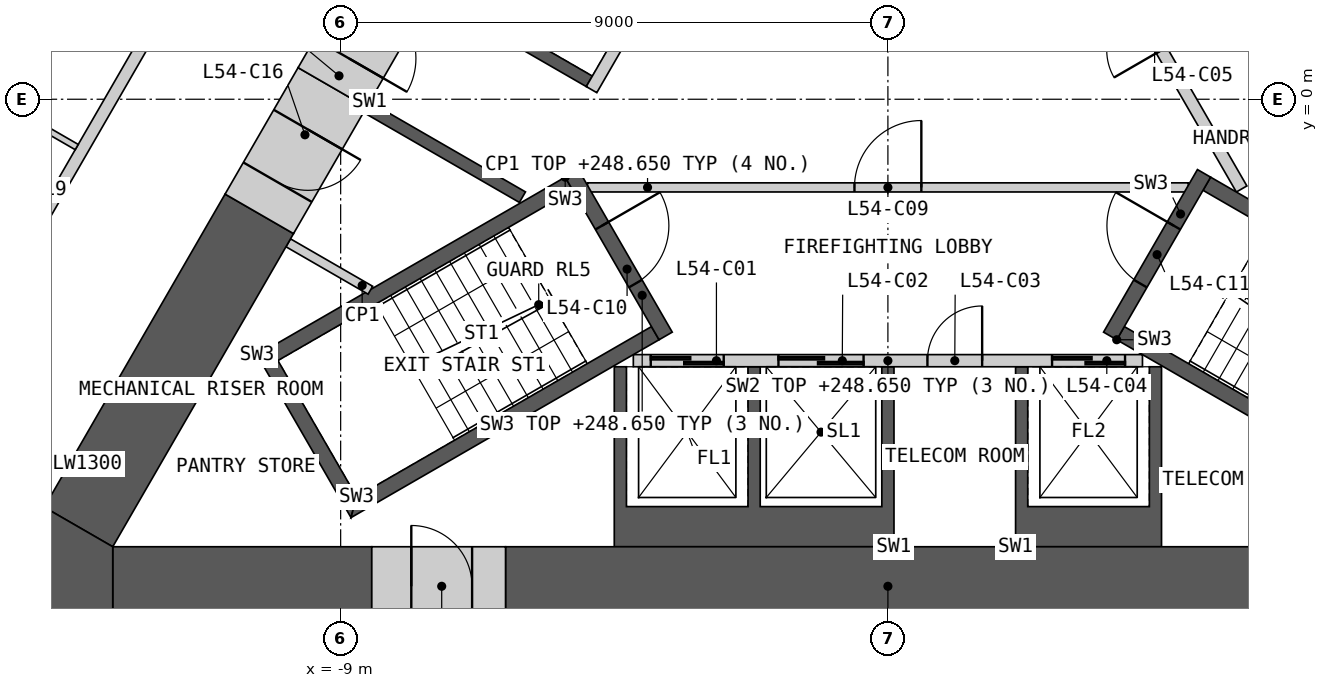
"""IFC4 building model, lengths in metres.
Left out: names, types, materials, properties, quantities, classifications, styles, units other than length and angle.
Written with IfcOpenShell. Run it as: python <this file> out.ifc"""

import sys

from ifc_helpers import new_model, si_unit, direction, frame, frame_2d, origin, place, context, subcontext, project, spatial, polyline, rectangle, outline, extrude, element, fill, save


model = new_model("IFC4")
c1 = context("Model", 3, precision=1e-05, world=origin(), true_north=direction((0.0, 1.0)))
c2 = subcontext(c1, "Body", "Model", "MODEL_VIEW")
j1 = project(units=[si_unit("LENGTHUNIT", "METRE"), si_unit("PLANEANGLEUNIT", "RADIAN")], contexts=[c1])
p1 = place(None, origin())
s1 = spatial("IfcSite", under=j1, at=p1, CompositionType="ELEMENT")
p2 = place(p1, origin())
s2 = spatial("IfcBuilding", under=s1, at=p2, CompositionType="ELEMENT")
p3 = place(p2, frame((0.0, 0.0, 245.4)))
s3 = spatial("IfcBuildingStorey", under=s2, at=p3, CompositionType="ELEMENT", Elevation=245.4)
p4 = place(p3, origin())
e1 = element("IfcWall", 1, at=p4, inside=s3, PredefinedType="SHEAR", context=c2, shape_type="SweptSolid", body=[
    extrude(outline(polyline([(0.1, -7.36), (-4.5, -7.36), (-4.5, -4.4), (-4.3, -4.4), (-4.3, -6.7), (-2.3, -6.7), (-2.3, -4.4), (-2.1, -4.4), (-2.1, -6.7), (-0.1, -6.7), (-0.1, -4.4), (0.1, -4.4), (0.1, -7.36)])), origin(), (0.0, 0.0, 1.0), 3.25),
])
p5 = place(p3, origin())
e2 = element("IfcWall", 2, at=p5, inside=s3, PredefinedType="SHEAR", context=c2, shape_type="SweptSolid", body=[
    extrude(outline(polyline([(2.1, -7.36), (2.1, -4.4), (2.3, -4.4), (2.3, -6.7), (4.3, -6.7), (4.3, -4.4), (4.5, -4.4), (4.5, -7.36), (2.1, -7.36)])), origin(), (0.0, 0.0, 1.0), 3.25),
])
p6 = place(p3, frame((-4.187, -4.3, 0.0), z_axis=(0.0, 0.0, 1.0), x_axis=(1.0, 0.0, 0.0)))
e3 = element("IfcWall", 3, at=p6, inside=s3, PredefinedType="SOLIDWALL", context=c2, shape_type="SweptSolid", body=[
    extrude(rectangle(XDim=8.373, YDim=0.2, at=frame_2d((4.187, 0.0))), origin(), (0.0, 0.0, 1.0), 3.25),
])
p7 = place(p6, frame((0.287, 0.0, 0.0)))
e4 = element("IfcOpeningElement", 4, at=p7, cuts=e3, PredefinedType="OPENING", context=c2, shape_type="SweptSolid", body=[
    extrude(rectangle(XDim=1.2, YDim=2.1, at=frame_2d((0.6, 1.05))), frame((0.0, 0.11, 0.0), z_axis=(0.0, -1.0, 0.0), x_axis=(1.0, 0.0, 0.0)), (0.0, 0.0, 1.0), 0.22),
])
p8 = place(p6, frame((2.387, 0.0, 0.0)))
e5 = element("IfcOpeningElement", 5, at=p8, cuts=e3, PredefinedType="OPENING", context=c2, shape_type="SweptSolid", body=[
    extrude(rectangle(XDim=1.4, YDim=2.1, at=frame_2d((0.7, 1.05))), frame((0.0, 0.11, 0.0), z_axis=(0.0, -1.0, 0.0), x_axis=(1.0, 0.0, 0.0)), (0.0, 0.0, 1.0), 0.22),
])
p9 = place(p6, frame((4.837, 0.0, 0.0)))
e6 = element("IfcOpeningElement", 6, at=p9, cuts=e3, PredefinedType="OPENING", context=c2, shape_type="SweptSolid", body=[
    extrude(rectangle(XDim=0.9, YDim=2.1, at=frame_2d((0.45, 1.05))), frame((0.0, 0.11, 0.0), z_axis=(0.0, -1.0, 0.0), x_axis=(1.0, 0.0, 0.0)), (0.0, 0.0, 1.0), 0.22),
])
p10 = place(p6, frame((6.887, 0.0, 0.0)))
e7 = element("IfcOpeningElement", 7, at=p10, cuts=e3, PredefinedType="OPENING", context=c2, shape_type="SweptSolid", body=[
    extrude(rectangle(XDim=1.2, YDim=2.1, at=frame_2d((0.6, 1.05))), frame((0.0, 0.11, 0.0), z_axis=(0.0, -1.0, 0.0), x_axis=(1.0, 0.0, 0.0)), (0.0, 0.0, 1.0), 0.22),
])
p11 = place(p3, origin())
e8 = element("IfcWall", 8, at=p11, inside=s3, PredefinedType="SHEAR", context=c2, shape_type="SweptSolid", body=[
    extrude(outline(polyline([(4.124, 7.577), (8.624, -0.217), (8.231, -0.444), (6.061, -1.697), (5.96, -1.524), (7.952, -0.374), (4.752, 5.169), (2.76, 4.019), (2.66, 4.192), (4.652, 5.342), (3.652, 7.074), (1.66, 5.924), (1.561, 6.097), (3.731, 7.35), (4.124, 7.577)])), origin(), (0.0, 0.0, 1.0), 3.25),
])
p12 = place(p3, frame((5.817, -1.476, 0.0), z_axis=(0.0, 0.0, 1.0), x_axis=(-0.500002616675, 0.866023893041, 0.0)))
e9 = element("IfcWall", 9, at=p12, inside=s3, PredefinedType="SOLIDWALL", context=c2, shape_type="SweptSolid", body=[
    extrude(rectangle(XDim=8.373, YDim=0.2, at=frame_2d((4.187, 0.0))), origin(), (0.0, 0.0, 1.0), 3.25),
])
p13 = place(p12, frame((2.637, 0.0, 0.0)))
e10 = element("IfcOpeningElement", 10, at=p13, cuts=e9, PredefinedType="OPENING", context=c2, shape_type="SweptSolid", body=[
    extrude(rectangle(XDim=0.9, YDim=2.1, at=frame_2d((0.45, 1.05))), frame((0.0, 0.11, 0.0), z_axis=(0.0, -1.0, 0.0), x_axis=(1.0, 0.0, 0.0)), (0.0, 0.0, 1.0), 0.22),
])
p14 = place(p12, frame((6.937, 0.0, 0.0)))
e11 = element("IfcOpeningElement", 11, at=p14, cuts=e9, PredefinedType="OPENING", context=c2, shape_type="SweptSolid", body=[
    extrude(rectangle(XDim=1.1, YDim=2.1, at=frame_2d((0.55, 1.05))), frame((0.0, 0.11, 0.0), z_axis=(0.0, -1.0, 0.0), x_axis=(1.0, 0.0, 0.0)), (0.0, 0.0, 1.0), 0.22),
])
p15 = place(p3, origin())
e12 = element("IfcWall", 12, at=p15, inside=s3, PredefinedType="SHEAR", context=c2, shape_type="SweptSolid", body=[
    extrude(outline(polyline([(-7.524, 1.688), (-4.124, 7.577), (-3.731, 7.35), (-1.561, 6.097), (-1.66, 5.924), (-3.652, 7.074), (-4.652, 5.342), (-2.66, 4.192), (-2.76, 4.019), (-4.752, 5.169), (-5.752, 3.437), (-3.76, 2.287), (-3.861, 2.113), (-5.852, 3.263), (-6.852, 1.531), (-4.861, 0.381), (-4.96, 0.208), (-7.131, 1.461), (-7.524, 1.688)])), origin(), (0.0, 0.0, 1.0), 3.25),
])
p16 = place(p3, origin())
e13 = element("IfcWall", 13, at=p16, inside=s3, PredefinedType="SHEAR", context=c2, shape_type="SweptSolid", body=[
    extrude(outline(polyline([(-8.524, -0.044), (-8.131, -0.271), (-5.96, -1.524), (-6.061, -1.697), (-8.231, -0.444), (-8.624, -0.217), (-8.524, -0.044)])), origin(), (0.0, 0.0, 1.0), 3.25),
])
p17 = place(p3, frame((-1.631, 5.776, 0.0), z_axis=(0.0, 0.0, 1.0), x_axis=(-0.499992876559, -0.866029516466, 0.0)))
e14 = element("IfcWall", 14, at=p17, inside=s3, PredefinedType="SOLIDWALL", context=c2, shape_type="SweptSolid", body=[
    extrude(rectangle(XDim=6.486, YDim=0.2, at=frame_2d((3.243, 0.0))), origin(), (0.0, 0.0, 1.0), 3.25),
])
p18 = place(p17, frame((0.337, 0.0, 0.0)))
e15 = element("IfcOpeningElement", 15, at=p18, cuts=e14, PredefinedType="OPENING", context=c2, shape_type="SweptSolid", body=[
    extrude(rectangle(XDim=1.1, YDim=2.1, at=frame_2d((0.55, 1.05))), frame((0.0, 0.11, 0.0), z_axis=(0.0, -1.0, 0.0), x_axis=(1.0, 0.0, 0.0)), (0.0, 0.0, 1.0), 0.22),
])
p19 = place(p17, frame((2.537, 0.0, 0.0)))
e16 = element("IfcOpeningElement", 16, at=p19, cuts=e14, PredefinedType="OPENING", context=c2, shape_type="SweptSolid", body=[
    extrude(rectangle(XDim=1.1, YDim=2.1, at=frame_2d((0.55, 1.05))), frame((0.0, 0.11, 0.0), z_axis=(0.0, -1.0, 0.0), x_axis=(1.0, 0.0, 0.0)), (0.0, 0.0, 1.0), 0.22),
])
p20 = place(p3, frame((-4.941, -1.45, 0.0), z_axis=(0.0, 0.0, 1.0), x_axis=(1.0, 0.0, 0.0)))
e17 = element("IfcWall", 17, at=p20, inside=s3, PredefinedType="PARTITIONING", context=c2, shape_type="SweptSolid", body=[
    extrude(rectangle(XDim=9.882, YDim=0.15, at=frame_2d((4.941, 0.0))), origin(), (0.0, 0.0, 1.0), 3.25),
])
p21 = place(p20, frame((4.391, 0.0, 0.0)))
e18 = element("IfcOpeningElement", 18, at=p21, cuts=e17, PredefinedType="OPENING", context=c2, shape_type="SweptSolid", body=[
    extrude(rectangle(XDim=1.1, YDim=2.1, at=frame_2d((0.55, 1.05))), frame((0.0, 0.085, 0.0), z_axis=(0.0, -1.0, 0.0), x_axis=(1.0, 0.0, 0.0)), (0.0, 0.0, 1.0), 0.17),
])
p22 = place(p3, origin())
e19 = element("IfcWall", 19, at=p22, inside=s3, PredefinedType="SHEAR", context=c2, shape_type="SweptSolid", body=[
    extrude(outline(polyline([(-5.307, -1.281), (-10.374, -4.206), (-10.032, -4.298), (-5.182, -1.498), (-5.307, -1.281)])), origin(), (0.0, 0.0, 1.0), 3.25),
])
p23 = place(p3, origin())
e20 = element("IfcWall", 20, at=p23, inside=s3, PredefinedType="SHEAR", context=c2, shape_type="SweptSolid", body=[
    extrude(outline(polyline([(-10.374, -4.206), (-8.83, -6.881), (-8.738, -6.539), (-10.032, -4.298), (-10.374, -4.206)])), origin(), (0.0, 0.0, 1.0), 3.25),
])
p24 = place(p3, origin())
e21 = element("IfcWall", 21, at=p24, inside=s3, PredefinedType="SHEAR", context=c2, shape_type="SweptSolid", body=[
    extrude(outline(polyline([(-8.738, -6.539), (-8.83, -6.881), (-3.763, -3.956), (-3.888, -3.739), (-8.738, -6.539)])), origin(), (0.0, 0.0, 1.0), 3.25),
])
p25 = place(p3, frame((-5.199, -1.219, 0.0), z_axis=(0.0, 0.0, 1.0), x_axis=(0.499982516597, -0.866035497597, 0.0)))
e22 = element("IfcWall", 22, at=p25, inside=s3, PredefinedType="SHEAR", context=c2, shape_type="SweptSolid", body=[
    extrude(rectangle(XDim=3.088, YDim=0.25, at=frame_2d((1.544, 0.0))), origin(), (0.0, 0.0, 1.0), 3.25),
])
p26 = place(p25, frame((0.994, 0.0, 0.0)))
e23 = element("IfcOpeningElement", 23, at=p26, cuts=e22, PredefinedType="OPENING", context=c2, shape_type="SweptSolid", body=[
    extrude(rectangle(XDim=1.1, YDim=2.1, at=frame_2d((0.55, 1.05))), frame((0.0, 0.135, 0.0), z_axis=(0.0, -1.0, 0.0), x_axis=(1.0, 0.0, 0.0)), (0.0, 0.0, 1.0), 0.27),
])
p27 = place(p3, origin())
e24 = element("IfcWall", 24, at=p27, inside=s3, PredefinedType="SHEAR", context=c2, shape_type="SweptSolid", body=[
    extrude(outline(polyline([(3.763, -3.956), (8.83, -6.881), (8.738, -6.539), (3.888, -3.739), (3.763, -3.956)])), origin(), (0.0, 0.0, 1.0), 3.25),
])
p28 = place(p3, origin())
e25 = element("IfcWall", 25, at=p28, inside=s3, PredefinedType="SHEAR", context=c2, shape_type="SweptSolid", body=[
    extrude(outline(polyline([(10.032, -4.298), (10.374, -4.206), (5.307, -1.281), (5.182, -1.498), (10.032, -4.298)])), origin(), (0.0, 0.0, 1.0), 3.25),
])
p29 = place(p3, frame((3.655, -3.893, 0.0), z_axis=(0.0, 0.0, 1.0), x_axis=(0.499982516597, 0.866035497597, 0.0)))
e26 = element("IfcWall", 26, at=p29, inside=s3, PredefinedType="SHEAR", context=c2, shape_type="SweptSolid", body=[
    extrude(rectangle(XDim=3.088, YDim=0.25, at=frame_2d((1.544, 0.0))), origin(), (0.0, 0.0, 1.0), 3.25),
])
p30 = place(p29, frame((0.994, 0.0, 0.0)))
e27 = element("IfcOpeningElement", 27, at=p30, cuts=e26, PredefinedType="OPENING", context=c2, shape_type="SweptSolid", body=[
    extrude(rectangle(XDim=1.1, YDim=2.1, at=frame_2d((0.55, 1.05))), frame((0.0, 0.135, 0.0), z_axis=(0.0, -1.0, 0.0), x_axis=(1.0, 0.0, 0.0)), (0.0, 0.0, 1.0), 0.27),
])
p31 = place(p3, frame((-9.862, -2.361, 0.0), z_axis=(0.0, 0.0, 1.0), x_axis=(0.865990094875, -0.500061151839, 0.0)))
e28 = element("IfcWall", 28, at=p31, inside=s3, PredefinedType="PARTITIONING", context=c2, shape_type="SweptSolid", body=[
    extrude(rectangle(XDim=1.56, YDim=0.15, at=frame_2d((0.78, 0.0))), origin(), (0.0, 0.0, 1.0), 3.25),
])
p32 = place(p3, frame((-6.288, -8.01, 0.0), z_axis=(0.0, 0.0, 1.0), x_axis=(1.0, 0.0, 0.0)))
e29 = element("IfcWall", 29, at=p32, inside=s3, PredefinedType="SHEAR", context=c2, shape_type="SweptSolid", body=[
    extrude(rectangle(XDim=12.576, YDim=1.3, at=frame_2d((6.288, 0.0))), origin(), (0.0, 0.0, 1.0), 3.25),
])
p33 = place(p3, frame((-12.748, -8.01, 0.0), z_axis=(0.0, 0.0, 1.0), x_axis=(1.0, 0.0, 0.0)))
e30 = element("IfcWall", 30, at=p33, inside=s3, PredefinedType="SHEAR", context=c2, shape_type="SweptSolid", body=[
    extrude(rectangle(XDim=4.26, YDim=1.3, at=frame_2d((2.13, 0.0))), origin(), (0.0, 0.0, 1.0), 3.25),
])
p34 = place(p3, frame((10.062, -1.408, 0.0), z_axis=(0.0, 0.0, 1.0), x_axis=(-0.500000545805, 0.866025088663, 0.0)))
e31 = element("IfcWall", 31, at=p34, inside=s3, PredefinedType="SHEAR", context=c2, shape_type="SweptSolid", body=[
    extrude(rectangle(XDim=12.539, YDim=1.3, at=frame_2d((6.27, 0.0))), origin(), (0.0, 0.0, 1.0), 3.25),
])
p35 = place(p3, frame((-10.338, -1.885, 0.0), z_axis=(0.0, 0.0, 1.0), x_axis=(-0.499975944838, -0.866039291593, 0.0)))
e32 = element("IfcWall", 32, at=p35, inside=s3, PredefinedType="SHEAR", context=c2, shape_type="SweptSolid", body=[
    extrude(rectangle(XDim=5.947, YDim=1.3, at=frame_2d((2.974, 0.0))), origin(), (0.0, 0.0, 1.0), 3.25),
])
p36 = place(p3, origin())
e33 = element("IfcWall", 33, at=p36, inside=s3, PredefinedType="SHEAR", context=c2, shape_type="SweptSolid", body=[
    extrude(outline(polyline([(-13.874, -6.71), (-12.748, -7.36), (-12.748, -8.66), (-15.0, -8.66), (-13.874, -6.71)])), origin(), (0.0, 0.0, 1.0), 3.25),
])
p37 = place(p3, frame((-8.488, -8.01, 0.0), z_axis=(0.0, 0.0, 1.0), x_axis=(1.0, 0.0, 0.0)))
e34 = element("IfcWall", 34, at=p37, inside=s3, PredefinedType="SHEAR", context=c2, shape_type="SweptSolid", body=[
    extrude(rectangle(XDim=2.2, YDim=1.3, at=frame_2d((1.1, 0.0))), origin(), (0.0, 0.0, 1.0), 3.25),
])
p38 = place(p37, frame((0.65, 0.0, 0.0)))
e35 = element("IfcOpeningElement", 35, at=p38, cuts=e34, PredefinedType="OPENING", context=c2, shape_type="SweptSolid", body=[
    extrude(rectangle(XDim=1.0, YDim=2.1, at=frame_2d((0.5, 1.05))), frame((0.0, 0.66, 0.0), z_axis=(0.0, -1.0, 0.0), x_axis=(1.0, 0.0, 0.0)), (0.0, 0.0, 1.0), 1.32),
])
p39 = place(p3, frame((-9.137, 0.195, 0.0), z_axis=(0.0, 0.0, 1.0), x_axis=(-0.500009943768, -0.866019662671, 0.0)))
e36 = element("IfcWall", 36, at=p39, inside=s3, PredefinedType="SHEAR", context=c2, shape_type="SweptSolid", body=[
    extrude(rectangle(XDim=2.401, YDim=1.3, at=frame_2d((1.201, 0.0))), origin(), (0.0, 0.0, 1.0), 3.25),
])
p40 = place(p39, frame((0.8, 0.0, 0.0)))
e37 = element("IfcOpeningElement", 37, at=p40, cuts=e36, PredefinedType="OPENING", context=c2, shape_type="SweptSolid", body=[
    extrude(rectangle(XDim=1.0, YDim=2.1, at=frame_2d((0.5, 1.05))), frame((0.0, 0.66, 0.0), z_axis=(0.0, -1.0, 0.0), x_axis=(1.0, 0.0, 0.0)), (0.0, 0.0, 1.0), 1.32),
])
p41 = place(p3, frame((-8.037, 2.1, 0.0), z_axis=(0.0, 0.0, 1.0), x_axis=(-0.50002983664, -0.866008176907, 0.0)))
e38 = element("IfcWall", 38, at=p41, inside=s3, PredefinedType="SHEAR", context=c2, shape_type="SweptSolid", body=[
    extrude(rectangle(XDim=2.2, YDim=1.3, at=frame_2d((1.1, 0.0))), origin(), (0.0, 0.0, 1.0), 3.25),
])
p42 = place(p41, frame((0.55, 0.0, 0.0)))
e39 = element("IfcOpeningElement", 39, at=p42, cuts=e38, PredefinedType="OPENING", context=c2, shape_type="SweptSolid", body=[
    extrude(rectangle(XDim=1.1, YDim=2.1, at=frame_2d((0.55, 1.05))), frame((0.0, 0.66, 0.0), z_axis=(0.0, -1.0, 0.0), x_axis=(1.0, 0.0, 0.0)), (0.0, 0.0, 1.0), 1.32),
])
p43 = place(p3, frame((-14.247, -2.556, 0.0), z_axis=(0.0, 0.0, 1.0), x_axis=(0.49998193945, 0.866035830797, 0.0)))
e40 = element("IfcWall", 40, at=p43, inside=s3, PredefinedType="PARTITIONING", context=c2, shape_type="SweptSolid", body=[
    extrude(rectangle(XDim=9.094, YDim=0.2, at=frame_2d((4.547, 0.0))), origin(), (0.0, 0.0, 1.0), 3.25),
])
p44 = place(p43, frame((6.833, 0.0, 0.0)))
e41 = element("IfcOpeningElement", 41, at=p44, cuts=e40, PredefinedType="OPENING", context=c2, shape_type="SweptSolid", body=[
    extrude(rectangle(XDim=1.1, YDim=2.1, at=frame_2d((0.55, 1.05))), frame((0.0, 0.11, 0.0), z_axis=(0.0, -1.0, 0.0), x_axis=(1.0, 0.0, 0.0)), (0.0, 0.0, 1.0), 0.22),
])
p45 = place(p3, frame((-15.462, 0.439, 0.0), z_axis=(0.0, 0.0, 1.0), x_axis=(0.865989751695, -0.500061746146, 0.0)))
e42 = element("IfcWall", 42, at=p45, inside=s3, PredefinedType="PARTITIONING", context=c2, shape_type="SweptSolid", body=[
    extrude(rectangle(XDim=2.45, YDim=0.1, at=frame_2d((1.225, 0.0))), origin(), (0.0, 0.0, 1.0), 2.404),
])
p46 = place(p7, origin())
e43 = element("IfcDoor", 43, at=p46, inside=s3, OperationType="SLIDING_TO_LEFT", PredefinedType="DOOR", context=c2, shape_type="SweptSolid", body=[
    extrude(rectangle(XDim=1.2, YDim=2.1, at=frame_2d((0.6, 1.05))), frame((0.0, 0.025, 0.0), z_axis=(0.0, -1.0, 0.0), x_axis=(1.0, 0.0, 0.0)), (0.0, 0.0, 1.0), 0.05),
])
fill(e4, e43)
p47 = place(p8, origin())
e44 = element("IfcDoor", 44, at=p47, inside=s3, OperationType="SLIDING_TO_LEFT", PredefinedType="DOOR", context=c2, shape_type="SweptSolid", body=[
    extrude(rectangle(XDim=1.4, YDim=2.1, at=frame_2d((0.7, 1.05))), frame((0.0, 0.025, 0.0), z_axis=(0.0, -1.0, 0.0), x_axis=(1.0, 0.0, 0.0)), (0.0, 0.0, 1.0), 0.05),
])
fill(e5, e44)
p48 = place(p9, origin())
e45 = element("IfcDoor", 45, at=p48, inside=s3, OperationType="SINGLE_SWING_RIGHT", PredefinedType="DOOR", context=c2, shape_type="SweptSolid", body=[
    extrude(rectangle(XDim=0.9, YDim=2.1, at=frame_2d((0.45, 1.05))), frame((0.0, 0.025, 0.0), z_axis=(0.0, -1.0, 0.0), x_axis=(1.0, 0.0, 0.0)), (0.0, 0.0, 1.0), 0.05),
])
fill(e6, e45)
p49 = place(p10, origin())
e46 = element("IfcDoor", 46, at=p49, inside=s3, OperationType="SLIDING_TO_LEFT", PredefinedType="DOOR", context=c2, shape_type="SweptSolid", body=[
    extrude(rectangle(XDim=1.2, YDim=2.1, at=frame_2d((0.6, 1.05))), frame((0.0, 0.025, 0.0), z_axis=(0.0, -1.0, 0.0), x_axis=(1.0, 0.0, 0.0)), (0.0, 0.0, 1.0), 0.05),
])
fill(e7, e46)
p50 = place(p21, origin())
e47 = element("IfcDoor", 47, at=p50, inside=s3, OperationType="SINGLE_SWING_RIGHT", PredefinedType="DOOR", context=c2, shape_type="SweptSolid", body=[
    extrude(rectangle(XDim=1.1, YDim=2.1, at=frame_2d((0.55, 1.05))), frame((0.0, 0.025, 0.0), z_axis=(0.0, -1.0, 0.0), x_axis=(1.0, 0.0, 0.0)), (0.0, 0.0, 1.0), 0.05),
])
fill(e18, e47)
p51 = place(p26, origin())
e48 = element("IfcDoor", 48, at=p51, inside=s3, OperationType="SINGLE_SWING_LEFT", PredefinedType="DOOR", context=c2, shape_type="SweptSolid", body=[
    extrude(rectangle(XDim=1.1, YDim=2.1, at=frame_2d((0.55, 1.05))), frame((0.0, 0.025, 0.0), z_axis=(0.0, -1.0, 0.0), x_axis=(1.0, 0.0, 0.0)), (0.0, 0.0, 1.0), 0.05),
])
fill(e23, e48)
p52 = place(p30, origin())
e49 = element("IfcDoor", 49, at=p52, inside=s3, OperationType="SINGLE_SWING_RIGHT", PredefinedType="DOOR", context=c2, shape_type="SweptSolid", body=[
    extrude(rectangle(XDim=1.1, YDim=2.1, at=frame_2d((0.55, 1.05))), frame((0.0, 0.025, 0.0), z_axis=(0.0, -1.0, 0.0), x_axis=(1.0, 0.0, 0.0)), (0.0, 0.0, 1.0), 0.05),
])
fill(e27, e49)
p53 = place(p38, origin())
e50 = element("IfcDoor", 50, at=p53, inside=s3, OperationType="SINGLE_SWING_LEFT", PredefinedType="DOOR", context=c2, shape_type="SweptSolid", body=[
    extrude(rectangle(XDim=1.0, YDim=2.1, at=frame_2d((0.5, 1.05))), frame((0.0, 0.405, 0.0), z_axis=(0.0, -1.0, 0.0), x_axis=(1.0, 0.0, 0.0)), (0.0, 0.0, 1.0), 0.05),
])
fill(e35, e50)
p54 = place(p40, origin())
e51 = element("IfcDoor", 51, at=p54, inside=s3, OperationType="SINGLE_SWING_LEFT", PredefinedType="DOOR", context=c2, shape_type="SweptSolid", body=[
    extrude(rectangle(XDim=1.0, YDim=2.1, at=frame_2d((0.5, 1.05))), frame((0.0, 0.405, 0.0), z_axis=(0.0, -1.0, 0.0), x_axis=(1.0, 0.0, 0.0)), (0.0, 0.0, 1.0), 0.05),
])
fill(e37, e51)
p55 = place(p42, origin())
e52 = element("IfcDoor", 52, at=p55, inside=s3, OperationType="SINGLE_SWING_RIGHT", PredefinedType="DOOR", context=c2, shape_type="SweptSolid", body=[
    extrude(rectangle(XDim=1.1, YDim=2.1, at=frame_2d((0.55, 1.05))), frame((0.0, 0.405, 0.0), z_axis=(0.0, -1.0, 0.0), x_axis=(1.0, 0.0, 0.0)), (0.0, 0.0, 1.0), 0.05),
])
fill(e39, e52)
save(model, sys.argv[1])
